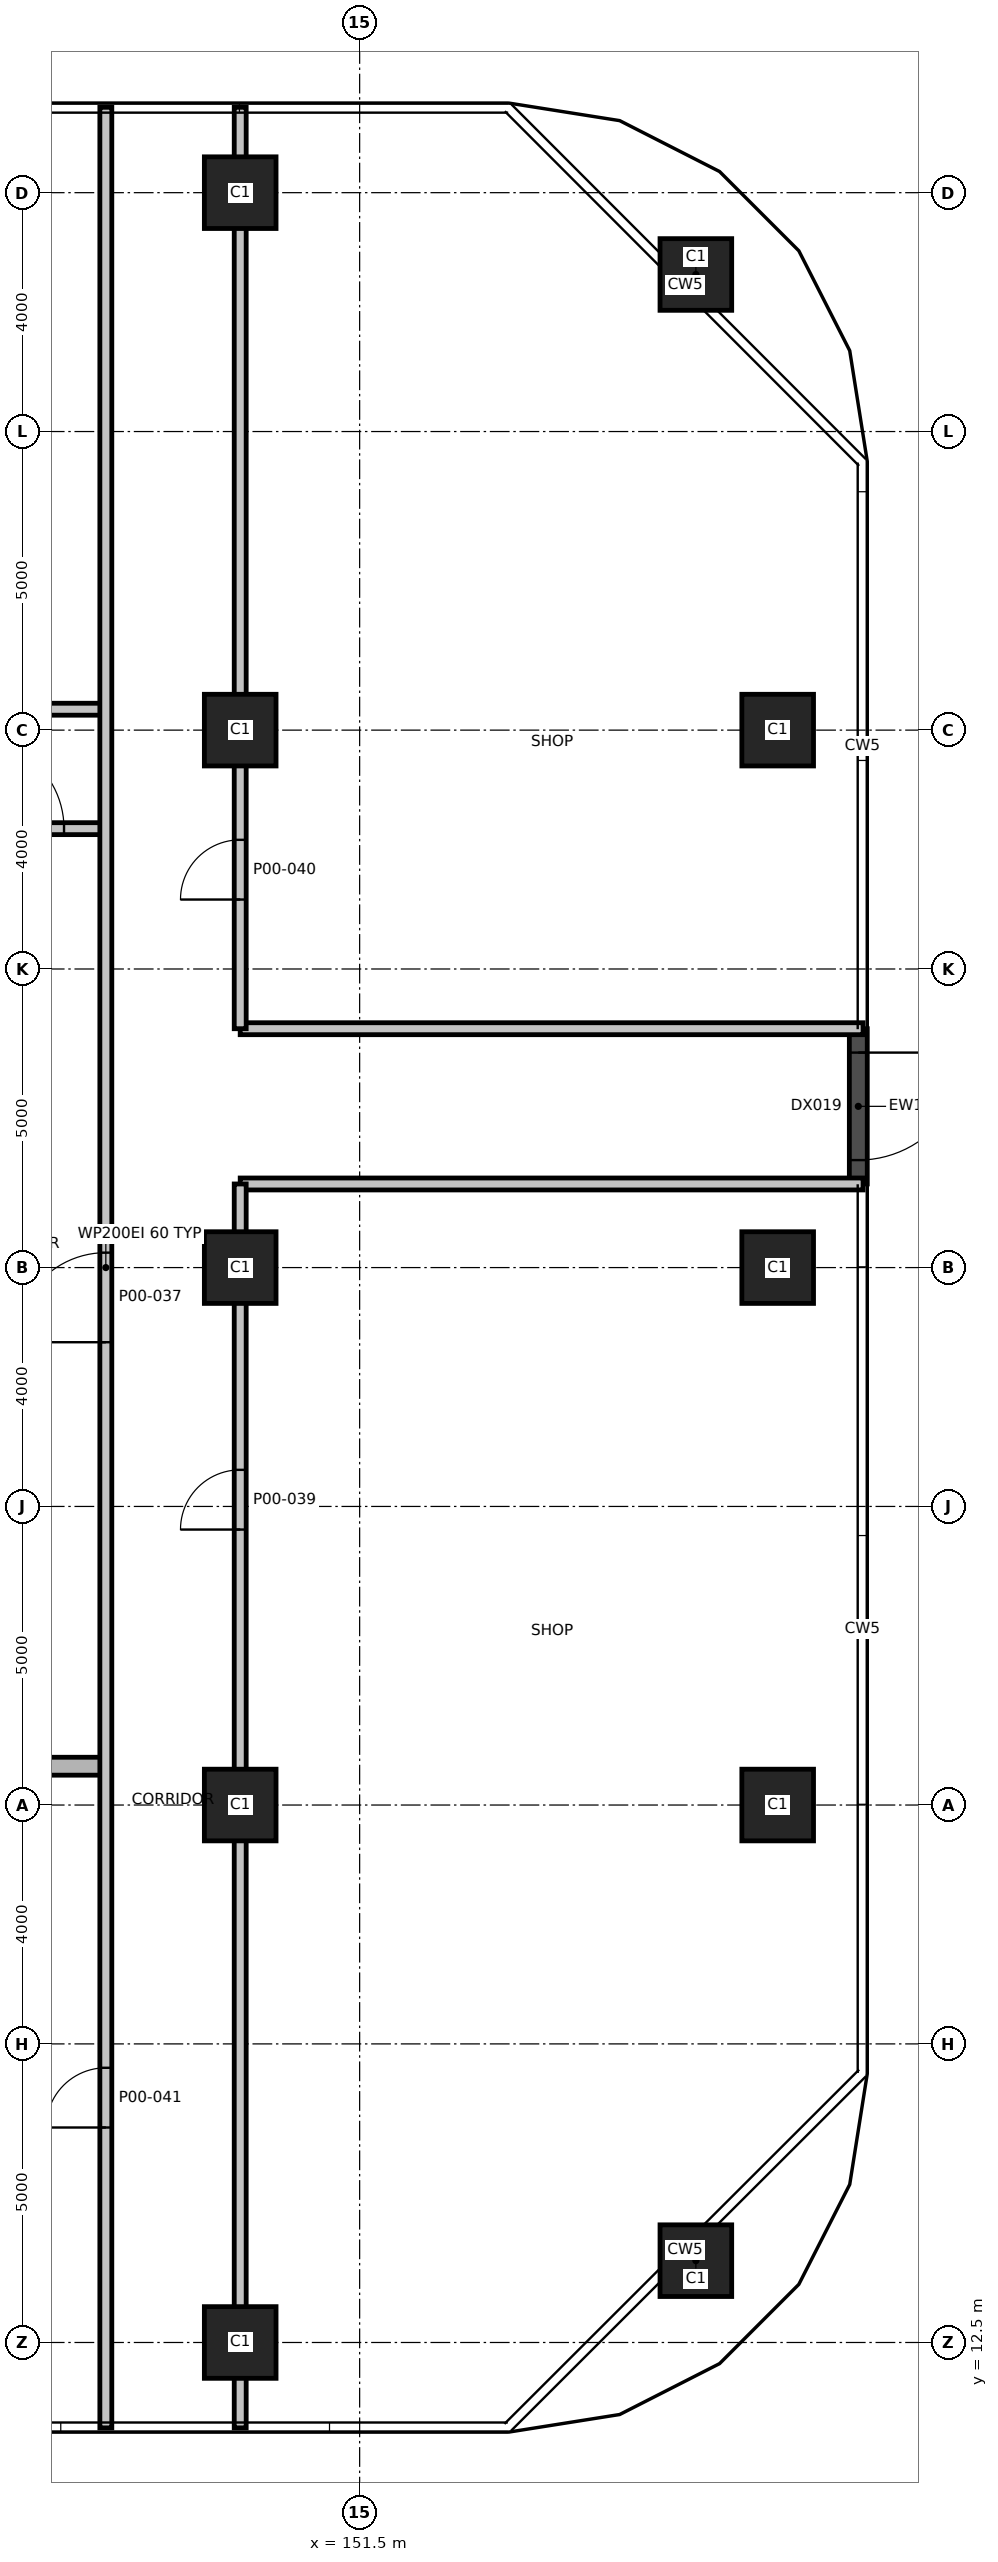
"""IFC4 building model, lengths in metres.
Left out: names, types, materials, properties, quantities, classifications, styles, units other than length and angle.
Written with IfcOpenShell. Run it as: python <this file> out.ifc"""

import sys

from ifc_helpers import new_model, si_unit, direction, frame, frame_2d, origin, origin_2d, place, context, subcontext, project, spatial, rectangle, extrude, element, fill, save


model = new_model("IFC4")
c1 = context("Model", 3, precision=1e-05, world=origin(), true_north=direction((0.0, 1.0)))
c2 = subcontext(c1, "Body", "Model", "MODEL_VIEW")
j1 = project(units=[si_unit("LENGTHUNIT", "METRE"), si_unit("PLANEANGLEUNIT", "RADIAN")], contexts=[c1])
p1 = place(None, origin())
s1 = spatial("IfcSite", under=j1, at=p1, CompositionType="ELEMENT")
p2 = place(p1, origin())
s2 = spatial("IfcBuilding", under=s1, at=p2, CompositionType="ELEMENT")
p3 = place(p2, origin())
s3 = spatial("IfcBuildingStorey", under=s2, at=p3, CompositionType="ELEMENT", Elevation=0.0)
for number, where, z_axis, x_axis in (
    (1, (149.5, 12.5, 0.0), (0.0, 0.0, 1.0), (1.0, 0.0, 0.0)),
    (2, (157.13, 13.87, 0.0), (0.0, 0.0, 1.0), (1.0, 0.0, 0.0)),
    (3, (149.5, 21.5, 0.0), (0.0, 0.0, 1.0), (1.0, 0.0, 0.0)),
    (4, (158.5, 21.5, 0.0), (0.0, 0.0, 1.0), (1.0, 0.0, 0.0)),
    (5, (149.5, 30.5, 0.0), (0.0, 0.0, 1.0), (1.0, 0.0, 0.0)),
    (6, (158.5, 30.5, 0.0), (0.0, 0.0, 1.0), (1.0, 0.0, 0.0)),
    (7, (149.5, 39.5, 0.0), (0.0, 0.0, 1.0), (1.0, 0.0, 0.0)),
    (8, (158.5, 39.5, 0.0), (0.0, 0.0, 1.0), (1.0, 0.0, 0.0)),
    (9, (157.13, 47.13, 0.0), (0.0, 0.0, 1.0), (1.0, 0.0, 0.0)),
    (10, (149.5, 48.5, 0.0), (0.0, 0.0, 1.0), (1.0, 0.0, 0.0)),
):
    element("IfcColumn", number, at=place(p3, frame(where, z_axis=z_axis, x_axis=x_axis)), inside=s3, PredefinedType="COLUMN", context=c2, shape_type="SweptSolid", body=[
        extrude(rectangle(XDim=1.2, YDim=1.2, at=origin_2d()), origin(), (0.0, 0.0, 1.0), 8.0),
    ])
p4 = place(p3, frame((159.85, 34.5, 0.0), z_axis=(0.0, 0.0, 1.0), x_axis=(0.0, -1.0, 0.0)))
e11 = element("IfcWall", 11, at=p4, inside=s3, PredefinedType="SOLIDWALL", context=c2, shape_type="SweptSolid", body=[
    extrude(rectangle(XDim=2.6, YDim=0.3, at=frame_2d((1.3, 0.0))), origin(), (0.0, 0.0, 1.0), 7.7),
])
p5 = place(p4, frame((0.4, 0.0, 0.0)))
e12 = element("IfcOpeningElement", 12, at=p5, cuts=e11, PredefinedType="OPENING", context=c2, shape_type="SweptSolid", body=[
    extrude(rectangle(XDim=1.8, YDim=2.4, at=frame_2d((0.9, 1.2))), frame((0.0, 0.16, 0.0), z_axis=(0.0, -1.0, 0.0), x_axis=(1.0, 0.0, 0.0)), (0.0, 0.0, 1.0), 0.32),
])
p6 = place(p3, frame((128.65, 22.15, 0.0), z_axis=(0.0, 0.0, 1.0), x_axis=(1.0, 0.0, 0.0)))
e13 = element("IfcWall", 13, at=p6, inside=s3, PredefinedType="SHEAR", context=c2, shape_type="SweptSolid", body=[
    extrude(rectangle(XDim=18.6, YDim=0.3, at=frame_2d((9.3, 0.0))), origin(), (0.0, 0.0, 1.0), 7.7),
])
p7 = place(p6, frame((14.1, 0.0, 0.0)))
e14 = element("IfcOpeningElement", 14, at=p7, cuts=e13, PredefinedType="OPENING", context=c2, shape_type="SweptSolid", body=[
    extrude(rectangle(XDim=1.0, YDim=2.1, at=frame_2d((0.5, 1.05))), frame((0.0, 0.16, 0.0), z_axis=(0.0, -1.0, 0.0), x_axis=(1.0, 0.0, 0.0)), (0.0, 0.0, 1.0), 0.32),
])
for number, where, z_axis, x_axis in (
    (15, (149.5, 31.9, 0.0), (0.0, 0.0, 1.0), (1.0, 0.0, 0.0)),
    (16, (149.5, 34.5, 0.0), (0.0, 0.0, 1.0), (1.0, 0.0, 0.0)),
):
    element("IfcWall", number, at=place(p3, frame(where, z_axis=z_axis, x_axis=x_axis)), inside=s3, PredefinedType="PARTITIONING", context=c2, shape_type="SweptSolid", body=[
        extrude(rectangle(XDim=10.43, YDim=0.2, at=frame_2d((5.215, 0.0))), origin(), (0.0, 0.0, 1.0), 6.8),
    ])
p8 = place(p3, frame((144.02, 37.85, 0.0), z_axis=(0.0, 0.0, 1.0), x_axis=(1.0, 0.0, 0.0)))
e17 = element("IfcWall", 17, at=p8, inside=s3, PredefinedType="PARTITIONING", context=c2, shape_type="SweptSolid", body=[
    extrude(rectangle(XDim=3.23, YDim=0.2, at=frame_2d((1.615, 0.0))), origin(), (0.0, 0.0, 1.0), 7.7),
])
p9 = place(p8, frame((1.03, 0.0, 0.0)))
e18 = element("IfcOpeningElement", 18, at=p9, cuts=e17, PredefinedType="OPENING", context=c2, shape_type="SweptSolid", body=[
    extrude(rectangle(XDim=1.5, YDim=2.1, at=frame_2d((0.75, 1.05))), frame((0.0, 0.11, 0.0), z_axis=(0.0, -1.0, 0.0), x_axis=(1.0, 0.0, 0.0)), (0.0, 0.0, 1.0), 0.22),
])
p10 = place(p3, frame((143.0, 39.85, 0.0), z_axis=(0.0, 0.0, 1.0), x_axis=(1.0, 0.0, 0.0)))
e19 = element("IfcWall", 19, at=p10, inside=s3, PredefinedType="PARTITIONING", context=c2, shape_type="SweptSolid", body=[
    extrude(rectangle(XDim=4.25, YDim=0.2, at=frame_2d((2.125, 0.0))), origin(), (0.0, 0.0, 1.0), 7.7),
])
p11 = place(p3, frame((147.25, 11.07, 0.0), z_axis=(0.0, 0.0, 1.0), x_axis=(0.0, 1.0, 0.0)))
e20 = element("IfcWall", 20, at=p11, inside=s3, PredefinedType="PARTITIONING", context=c2, shape_type="SweptSolid", body=[
    extrude(rectangle(XDim=38.86, YDim=0.2, at=frame_2d((19.43, 0.0))), origin(), (0.0, 0.0, 1.0), 6.8),
])
p12 = place(p11, frame((18.18, 0.0, 0.0)))
e21 = element("IfcOpeningElement", 21, at=p12, cuts=e20, PredefinedType="OPENING", context=c2, shape_type="SweptSolid", body=[
    extrude(rectangle(XDim=1.5, YDim=2.1, at=frame_2d((0.75, 1.05))), frame((0.0, 0.11, 0.0), z_axis=(0.0, -1.0, 0.0), x_axis=(1.0, 0.0, 0.0)), (0.0, 0.0, 1.0), 0.22),
])
p13 = place(p11, frame((5.03, 0.0, 0.0)))
e22 = element("IfcOpeningElement", 22, at=p13, cuts=e20, PredefinedType="OPENING", context=c2, shape_type="SweptSolid", body=[
    extrude(rectangle(XDim=1.0, YDim=2.1, at=frame_2d((0.5, 1.05))), frame((0.0, 0.11, 0.0), z_axis=(0.0, -1.0, 0.0), x_axis=(1.0, 0.0, 0.0)), (0.0, 0.0, 1.0), 0.22),
])
p14 = place(p3, frame((149.5, 11.07, 0.0), z_axis=(0.0, 0.0, 1.0), x_axis=(0.0, 1.0, 0.0)))
e23 = element("IfcWall", 23, at=p14, inside=s3, PredefinedType="PARTITIONING", context=c2, shape_type="SweptSolid", body=[
    extrude(rectangle(XDim=20.83, YDim=0.2, at=frame_2d((10.415, 0.0))), origin(), (0.0, 0.0, 1.0), 6.8),
])
p15 = place(p14, frame((15.043, 0.0, 0.0)))
e24 = element("IfcOpeningElement", 24, at=p15, cuts=e23, PredefinedType="OPENING", context=c2, shape_type="SweptSolid", body=[
    extrude(rectangle(XDim=1.0, YDim=2.1, at=frame_2d((0.5, 1.05))), frame((0.0, 0.11, 0.0), z_axis=(0.0, -1.0, 0.0), x_axis=(1.0, 0.0, 0.0)), (0.0, 0.0, 1.0), 0.22),
])
p16 = place(p3, frame((149.5, 34.5, 0.0), z_axis=(0.0, 0.0, 1.0), x_axis=(0.0, 1.0, 0.0)))
e25 = element("IfcWall", 25, at=p16, inside=s3, PredefinedType="PARTITIONING", context=c2, shape_type="SweptSolid", body=[
    extrude(rectangle(XDim=15.43, YDim=0.2, at=frame_2d((7.715, 0.0))), origin(), (0.0, 0.0, 1.0), 6.8),
])
p17 = place(p16, frame((2.163, 0.0, 0.0)))
e26 = element("IfcOpeningElement", 26, at=p17, cuts=e25, PredefinedType="OPENING", context=c2, shape_type="SweptSolid", body=[
    extrude(rectangle(XDim=1.0, YDim=2.1, at=frame_2d((0.5, 1.05))), frame((0.0, 0.11, 0.0), z_axis=(0.0, -1.0, 0.0), x_axis=(1.0, 0.0, 0.0)), (0.0, 0.0, 1.0), 0.22),
])
p18 = place(p5, origin())
e27 = element("IfcDoor", 27, at=p18, inside=s3, OperationType="SINGLE_SWING_LEFT", PredefinedType="DOOR", context=c2, shape_type="SweptSolid", body=[
    extrude(rectangle(XDim=1.8, YDim=2.4, at=frame_2d((0.9, 1.2))), frame((0.0, 0.025, 0.0), z_axis=(0.0, -1.0, 0.0), x_axis=(1.0, 0.0, 0.0)), (0.0, 0.0, 1.0), 0.05),
])
fill(e12, e27)
p19 = place(p9, origin())
e28 = element("IfcDoor", 28, at=p19, inside=s3, OperationType="SINGLE_SWING_RIGHT", PredefinedType="DOOR", context=c2, shape_type="SweptSolid", body=[
    extrude(rectangle(XDim=1.5, YDim=2.1, at=frame_2d((0.75, 1.05))), frame((0.0, 0.025, 0.0), z_axis=(0.0, -1.0, 0.0), x_axis=(1.0, 0.0, 0.0)), (0.0, 0.0, 1.0), 0.05),
])
fill(e18, e28)
p20 = place(p12, origin())
e29 = element("IfcDoor", 29, at=p20, inside=s3, OperationType="SINGLE_SWING_LEFT", PredefinedType="DOOR", context=c2, shape_type="SweptSolid", body=[
    extrude(rectangle(XDim=1.5, YDim=2.1, at=frame_2d((0.75, 1.05))), frame((0.0, 0.025, 0.0), z_axis=(0.0, -1.0, 0.0), x_axis=(1.0, 0.0, 0.0)), (0.0, 0.0, 1.0), 0.05),
])
fill(e21, e29)
p21 = place(p15, origin())
e30 = element("IfcDoor", 30, at=p21, inside=s3, OperationType="SINGLE_SWING_LEFT", PredefinedType="DOOR", context=c2, shape_type="SweptSolid", body=[
    extrude(rectangle(XDim=1.0, YDim=2.1, at=frame_2d((0.5, 1.05))), frame((0.0, 0.025, 0.0), z_axis=(0.0, -1.0, 0.0), x_axis=(1.0, 0.0, 0.0)), (0.0, 0.0, 1.0), 0.05),
])
fill(e24, e30)
p22 = place(p17, origin())
e31 = element("IfcDoor", 31, at=p22, inside=s3, OperationType="SINGLE_SWING_RIGHT", PredefinedType="DOOR", context=c2, shape_type="SweptSolid", body=[
    extrude(rectangle(XDim=1.0, YDim=2.1, at=frame_2d((0.5, 1.05))), frame((0.0, 0.025, 0.0), z_axis=(0.0, -1.0, 0.0), x_axis=(1.0, 0.0, 0.0)), (0.0, 0.0, 1.0), 0.05),
])
fill(e26, e31)
p23 = place(p13, origin())
e32 = element("IfcDoor", 32, at=p23, inside=s3, OperationType="SINGLE_SWING_LEFT", PredefinedType="DOOR", context=c2, shape_type="SweptSolid", body=[
    extrude(rectangle(XDim=1.0, YDim=2.1, at=frame_2d((0.5, 1.05))), frame((0.0, 0.025, 0.0), z_axis=(0.0, -1.0, 0.0), x_axis=(1.0, 0.0, 0.0)), (0.0, 0.0, 1.0), 0.05),
])
fill(e22, e32)
save(model, sys.argv[1])
